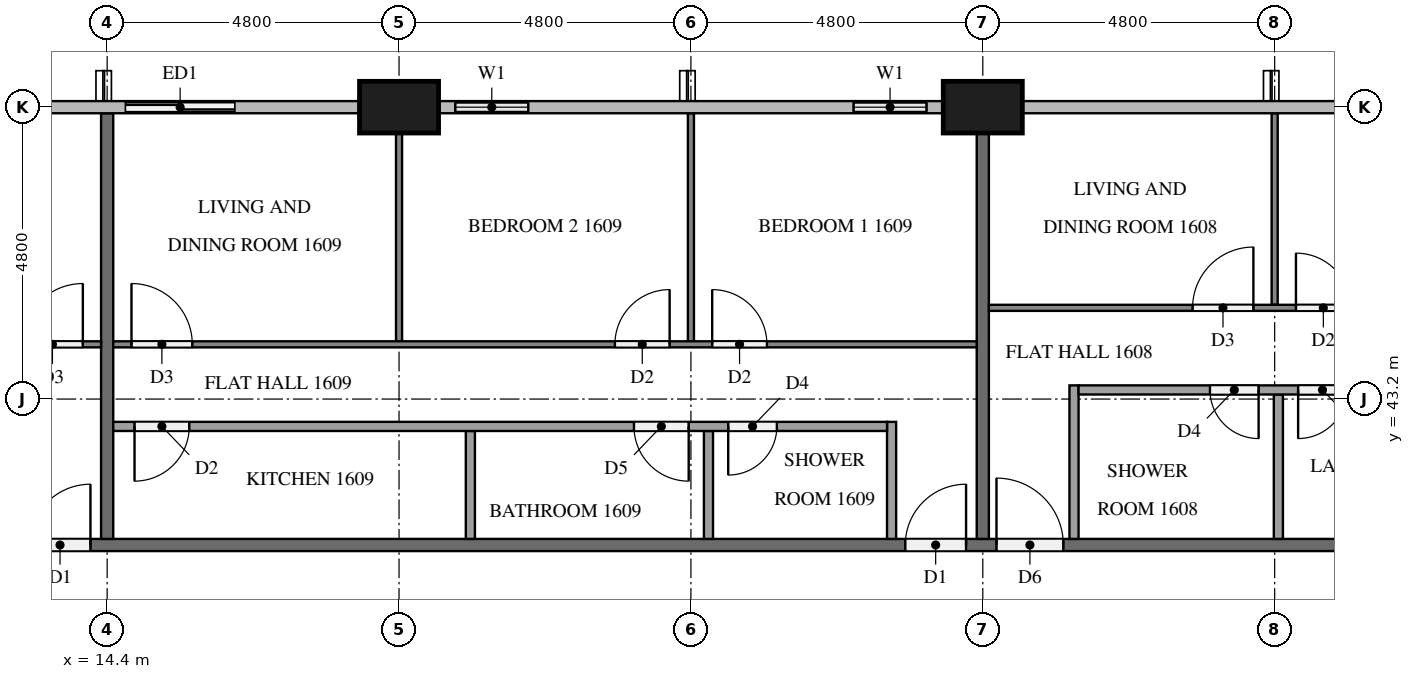
"""IFC4 building model, lengths in metres.
Left out: names, types, materials, properties, quantities, classifications, styles, units other than length and angle.
Written with IfcOpenShell. Run it as: python <this file> out.ifc"""

import sys

from ifc_helpers import new_model, si_unit, direction, frame, frame_2d, origin, origin_2d, place, context, subcontext, project, spatial, rectangle, extrude, element, fill, save


model = new_model("IFC4")
c1 = context("Model", 3, precision=1e-05, world=origin(), true_north=direction((0.0, 1.0)))
c2 = subcontext(c1, "Body", "Model", "MODEL_VIEW")
j1 = project(units=[si_unit("LENGTHUNIT", "METRE"), si_unit("PLANEANGLEUNIT", "RADIAN")], contexts=[c1])
p1 = place(None, origin())
s1 = spatial("IfcSite", under=j1, at=p1, CompositionType="ELEMENT")
p2 = place(p1, origin())
s2 = spatial("IfcBuilding", under=s1, at=p2, CompositionType="ELEMENT")
p3 = place(p2, frame((0.0, 0.0, 66.3)))
s3 = spatial("IfcBuildingStorey", under=s2, at=p3, CompositionType="ELEMENT", Elevation=66.3)
for number, where, z_axis, x_axis in (
    (1, (28.8, 48.0, 0.0), (0.0, 0.0, 1.0), (1.0, 0.0, 0.0)),
    (2, (19.2, 48.0, 0.0), (0.0, 0.0, 1.0), (1.0, 0.0, 0.0)),
):
    element("IfcColumn", number, at=place(p3, frame(where, z_axis=z_axis, x_axis=x_axis)), inside=s3, PredefinedType="COLUMN", context=c2, shape_type="SweptSolid", body=[
        extrude(rectangle(XDim=1.3, YDim=0.85, at=origin_2d()), origin(), (0.0, 0.0, 1.0), 3.2),
    ])
p4 = place(p3, frame((28.15, 48.0, 0.0), z_axis=(0.0, 0.0, 1.0), x_axis=(-1.0, 0.0, 0.0)))
e3 = element("IfcWall", 3, at=p4, inside=s3, PredefinedType="SOLIDWALL", context=c2, shape_type="SweptSolid", body=[
    extrude(rectangle(XDim=1.75, YDim=0.15, at=frame_2d((0.875, 0.0))), origin(), (0.0, 0.0, 1.0), 3.2),
])
p5 = place(p4, frame((0.275, 0.0, 0.9)))
e4 = element("IfcOpeningElement", 4, at=p5, cuts=e3, PredefinedType="OPENING", context=c2, shape_type="SweptSolid", body=[
    extrude(rectangle(XDim=1.2, YDim=1.4, at=frame_2d((0.6, 0.7))), frame((0.0, 0.085, 0.0), z_axis=(0.0, -1.0, 0.0), x_axis=(1.0, 0.0, 0.0)), (0.0, 0.0, 1.0), 0.17),
])
p6 = place(p3, frame((21.6, 48.0, 0.0), z_axis=(0.0, 0.0, 1.0), x_axis=(-1.0, 0.0, 0.0)))
e5 = element("IfcWall", 5, at=p6, inside=s3, PredefinedType="SOLIDWALL", context=c2, shape_type="SweptSolid", body=[
    extrude(rectangle(XDim=1.75, YDim=0.15, at=frame_2d((0.875, 0.0))), origin(), (0.0, 0.0, 1.0), 3.2),
])
p7 = place(p6, frame((0.275, 0.0, 0.9)))
e6 = element("IfcOpeningElement", 6, at=p7, cuts=e5, PredefinedType="OPENING", context=c2, shape_type="SweptSolid", body=[
    extrude(rectangle(XDim=1.2, YDim=1.4, at=frame_2d((0.6, 0.7))), frame((0.0, 0.085, 0.0), z_axis=(0.0, -1.0, 0.0), x_axis=(1.0, 0.0, 0.0)), (0.0, 0.0, 1.0), 0.17),
])
p8 = place(p3, frame((16.8, 48.0, 0.0), z_axis=(0.0, 0.0, 1.0), x_axis=(-1.0, 0.0, 0.0)))
e7 = element("IfcWall", 7, at=p8, inside=s3, PredefinedType="SOLIDWALL", context=c2, shape_type="SweptSolid", body=[
    extrude(rectangle(XDim=2.4, YDim=0.15, at=frame_2d((1.2, 0.0))), origin(), (0.0, 0.0, 1.0), 3.2),
])
p9 = place(p8, frame((0.3, 0.0, 0.0)))
e8 = element("IfcOpeningElement", 8, at=p9, cuts=e7, PredefinedType="OPENING", context=c2, shape_type="SweptSolid", body=[
    extrude(rectangle(XDim=1.8, YDim=2.4, at=frame_2d((0.9, 1.2))), frame((0.0, 0.085, 0.0), z_axis=(0.0, -1.0, 0.0), x_axis=(1.0, 0.0, 0.0)), (0.0, 0.0, 1.0), 0.17),
])
p10 = place(p3, frame((11.9, 40.8, 0.0), z_axis=(0.0, 0.0, 1.0), x_axis=(1.0, 0.0, 0.0)))
e9 = element("IfcWall", 9, at=p10, inside=s3, PredefinedType="PARTITIONING", context=c2, shape_type="SweptSolid", body=[
    extrude(rectangle(XDim=38.6, YDim=0.2, at=frame_2d((19.3, 0.0))), origin(), (0.0, 0.0, 1.0), 3.2),
])
p11 = place(p10, frame((36.375, 0.0, 0.0)))
e10 = element("IfcOpeningElement", 10, at=p11, cuts=e9, PredefinedType="OPENING", context=c2, shape_type="SweptSolid", body=[
    extrude(rectangle(XDim=1.0, YDim=2.1, at=frame_2d((0.5, 1.05))), frame((0.0, 0.11, 0.0), z_axis=(0.0, -1.0, 0.0), x_axis=(1.0, 0.0, 0.0)), (0.0, 0.0, 1.0), 0.22),
])
p12 = place(p10, frame((17.125, 0.0, 0.0)))
e11 = element("IfcOpeningElement", 11, at=p12, cuts=e9, PredefinedType="OPENING", context=c2, shape_type="SweptSolid", body=[
    extrude(rectangle(XDim=1.1, YDim=2.1, at=frame_2d((0.55, 1.05))), frame((0.0, 0.11, 0.0), z_axis=(0.0, -1.0, 0.0), x_axis=(1.0, 0.0, 0.0)), (0.0, 0.0, 1.0), 0.22),
])
p13 = place(p10, frame((15.625, 0.0, 0.0)))
e12 = element("IfcOpeningElement", 12, at=p13, cuts=e9, PredefinedType="OPENING", context=c2, shape_type="SweptSolid", body=[
    extrude(rectangle(XDim=1.0, YDim=2.1, at=frame_2d((0.5, 1.05))), frame((0.0, 0.11, 0.0), z_axis=(0.0, -1.0, 0.0), x_axis=(1.0, 0.0, 0.0)), (0.0, 0.0, 1.0), 0.22),
])
p14 = place(p10, frame((1.225, 0.0, 0.0)))
e13 = element("IfcOpeningElement", 13, at=p14, cuts=e9, PredefinedType="OPENING", context=c2, shape_type="SweptSolid", body=[
    extrude(rectangle(XDim=1.0, YDim=2.1, at=frame_2d((0.5, 1.05))), frame((0.0, 0.11, 0.0), z_axis=(0.0, -1.0, 0.0), x_axis=(1.0, 0.0, 0.0)), (0.0, 0.0, 1.0), 0.22),
])
p15 = place(p3, frame((28.8, 47.575, 0.0), z_axis=(0.0, 0.0, 1.0), x_axis=(0.0, -1.0, 0.0)))
e14 = element("IfcWall", 14, at=p15, inside=s3, PredefinedType="PARTITIONING", context=c2, shape_type="SweptSolid", body=[
    extrude(rectangle(XDim=6.675, YDim=0.2, at=frame_2d((3.337, 0.0))), origin(), (0.0, 0.0, 1.0), 3.2),
])
p16 = place(p3, frame((14.4, 47.9, 0.0), z_axis=(0.0, 0.0, 1.0), x_axis=(0.0, -1.0, 0.0)))
e15 = element("IfcWall", 15, at=p16, inside=s3, PredefinedType="PARTITIONING", context=c2, shape_type="SweptSolid", body=[
    extrude(rectangle(XDim=7.0, YDim=0.2, at=frame_2d((3.5, 0.0))), origin(), (0.0, 0.0, 1.0), 3.2),
])
p17 = place(p3, frame((33.6, 44.75, 0.0), z_axis=(0.0, 0.0, 1.0), x_axis=(0.0, 1.0, 0.0)))
e16 = element("IfcWall", 16, at=p17, inside=s3, PredefinedType="PARTITIONING", context=c2, shape_type="SweptSolid", body=[
    extrude(rectangle(XDim=3.15, YDim=0.1, at=frame_2d((1.575, 0.0))), origin(), (0.0, 0.0, 1.0), 3.2),
])
p18 = place(p3, frame((28.9, 44.7, 0.0), z_axis=(0.0, 0.0, 1.0), x_axis=(1.0, 0.0, 0.0)))
e17 = element("IfcWall", 17, at=p18, inside=s3, PredefinedType="PARTITIONING", context=c2, shape_type="SweptSolid", body=[
    extrude(rectangle(XDim=19.0, YDim=0.1, at=frame_2d((9.5, 0.0))), origin(), (0.0, 0.0, 1.0), 3.2),
])
p19 = place(p18, frame((3.35, 0.0, 0.0)))
e18 = element("IfcOpeningElement", 18, at=p19, cuts=e17, PredefinedType="OPENING", context=c2, shape_type="SweptSolid", body=[
    extrude(rectangle(XDim=1.0, YDim=2.1, at=frame_2d((0.5, 1.05))), frame((0.0, 0.06, 0.0), z_axis=(0.0, -1.0, 0.0), x_axis=(1.0, 0.0, 0.0)), (0.0, 0.0, 1.0), 0.12),
])
p20 = place(p18, frame((5.05, 0.0, 0.0)))
e19 = element("IfcOpeningElement", 19, at=p20, cuts=e17, PredefinedType="OPENING", context=c2, shape_type="SweptSolid", body=[
    extrude(rectangle(XDim=0.9, YDim=2.1, at=frame_2d((0.45, 1.05))), frame((0.0, 0.06, 0.0), z_axis=(0.0, -1.0, 0.0), x_axis=(1.0, 0.0, 0.0)), (0.0, 0.0, 1.0), 0.12),
])
p21 = place(p18, frame((13.05, 0.0, 0.0)))
e20 = element("IfcOpeningElement", 20, at=p21, cuts=e17, PredefinedType="OPENING", context=c2, shape_type="SweptSolid", body=[
    extrude(rectangle(XDim=0.9, YDim=2.1, at=frame_2d((0.45, 1.05))), frame((0.0, 0.06, 0.0), z_axis=(0.0, -1.0, 0.0), x_axis=(1.0, 0.0, 0.0)), (0.0, 0.0, 1.0), 0.12),
])
p22 = place(p18, frame((14.65, 0.0, 0.0)))
e21 = element("IfcOpeningElement", 21, at=p22, cuts=e17, PredefinedType="OPENING", context=c2, shape_type="SweptSolid", body=[
    extrude(rectangle(XDim=0.9, YDim=2.1, at=frame_2d((0.45, 1.05))), frame((0.0, 0.06, 0.0), z_axis=(0.0, -1.0, 0.0), x_axis=(1.0, 0.0, 0.0)), (0.0, 0.0, 1.0), 0.12),
])
p23 = place(p3, frame((33.661, 40.9, 0.0), z_axis=(0.0, 0.0, 1.0), x_axis=(0.0, 1.0, 0.0)))
e22 = element("IfcWall", 22, at=p23, inside=s3, PredefinedType="PARTITIONING", context=c2, shape_type="SweptSolid", body=[
    extrude(rectangle(XDim=2.375, YDim=0.15, at=frame_2d((1.188, 0.0))), origin(), (0.0, 0.0, 1.0), 3.2),
])
p24 = place(p3, frame((30.3, 40.9, 0.0), z_axis=(0.0, 0.0, 1.0), x_axis=(0.0, 1.0, 0.0)))
e23 = element("IfcWall", 23, at=p24, inside=s3, PredefinedType="PARTITIONING", context=c2, shape_type="SweptSolid", body=[
    extrude(rectangle(XDim=2.525, YDim=0.15, at=frame_2d((1.263, 0.0))), origin(), (0.0, 0.0, 1.0), 3.2),
])
p25 = place(p3, frame((47.9, 43.35, 0.0), z_axis=(0.0, 0.0, 1.0), x_axis=(-1.0, 0.0, 0.0)))
e24 = element("IfcWall", 24, at=p25, inside=s3, PredefinedType="PARTITIONING", context=c2, shape_type="SweptSolid", body=[
    extrude(rectangle(XDim=17.525, YDim=0.15, at=frame_2d((8.762, 0.0))), origin(), (0.0, 0.0, 1.0), 3.2),
])
p26 = place(p25, frame((14.564, 0.0, 0.0)))
e25 = element("IfcOpeningElement", 25, at=p26, cuts=e24, PredefinedType="OPENING", context=c2, shape_type="SweptSolid", body=[
    extrude(rectangle(XDim=0.8, YDim=2.1, at=frame_2d((0.4, 1.05))), frame((0.0, 0.085, 0.0), z_axis=(0.0, -1.0, 0.0), x_axis=(1.0, 0.0, 0.0)), (0.0, 0.0, 1.0), 0.17),
])
p27 = place(p25, frame((13.114, 0.0, 0.0)))
e26 = element("IfcOpeningElement", 26, at=p27, cuts=e24, PredefinedType="OPENING", context=c2, shape_type="SweptSolid", body=[
    extrude(rectangle(XDim=0.8, YDim=2.1, at=frame_2d((0.4, 1.05))), frame((0.0, 0.085, 0.0), z_axis=(0.0, -1.0, 0.0), x_axis=(1.0, 0.0, 0.0)), (0.0, 0.0, 1.0), 0.17),
])
p28 = place(p25, frame((4.706, 0.0, 0.0)))
e27 = element("IfcOpeningElement", 27, at=p28, cuts=e24, PredefinedType="OPENING", context=c2, shape_type="SweptSolid", body=[
    extrude(rectangle(XDim=0.9, YDim=2.1, at=frame_2d((0.45, 1.05))), frame((0.0, 0.085, 0.0), z_axis=(0.0, -1.0, 0.0), x_axis=(1.0, 0.0, 0.0)), (0.0, 0.0, 1.0), 0.17),
])
p29 = place(p25, frame((3.156, 0.0, 0.0)))
e28 = element("IfcOpeningElement", 28, at=p29, cuts=e24, PredefinedType="OPENING", context=c2, shape_type="SweptSolid", body=[
    extrude(rectangle(XDim=0.9, YDim=2.1, at=frame_2d((0.45, 1.05))), frame((0.0, 0.085, 0.0), z_axis=(0.0, -1.0, 0.0), x_axis=(1.0, 0.0, 0.0)), (0.0, 0.0, 1.0), 0.17),
])
p30 = place(p3, frame((24.0, 44.15, 0.0), z_axis=(0.0, 0.0, 1.0), x_axis=(0.0, 1.0, 0.0)))
e29 = element("IfcWall", 29, at=p30, inside=s3, PredefinedType="PARTITIONING", context=c2, shape_type="SweptSolid", body=[
    extrude(rectangle(XDim=3.75, YDim=0.1, at=frame_2d((1.875, 0.0))), origin(), (0.0, 0.0, 1.0), 3.2),
])
p31 = place(p3, frame((19.2, 44.15, 0.0), z_axis=(0.0, 0.0, 1.0), x_axis=(0.0, 1.0, 0.0)))
e30 = element("IfcWall", 30, at=p31, inside=s3, PredefinedType="PARTITIONING", context=c2, shape_type="SweptSolid", body=[
    extrude(rectangle(XDim=3.425, YDim=0.1, at=frame_2d((1.712, 0.0))), origin(), (0.0, 0.0, 1.0), 3.2),
])
p32 = place(p3, frame((14.5, 44.1, 0.0), z_axis=(0.0, 0.0, 1.0), x_axis=(1.0, 0.0, 0.0)))
e31 = element("IfcWall", 31, at=p32, inside=s3, PredefinedType="PARTITIONING", context=c2, shape_type="SweptSolid", body=[
    extrude(rectangle(XDim=14.2, YDim=0.1, at=frame_2d((7.1, 0.0))), origin(), (0.0, 0.0, 1.0), 3.2),
])
p33 = place(p32, frame((9.85, 0.0, 0.0)))
e32 = element("IfcOpeningElement", 32, at=p33, cuts=e31, PredefinedType="OPENING", context=c2, shape_type="SweptSolid", body=[
    extrude(rectangle(XDim=0.9, YDim=2.1, at=frame_2d((0.45, 1.05))), frame((0.0, 0.06, 0.0), z_axis=(0.0, -1.0, 0.0), x_axis=(1.0, 0.0, 0.0)), (0.0, 0.0, 1.0), 0.12),
])
p34 = place(p32, frame((8.25, 0.0, 0.0)))
e33 = element("IfcOpeningElement", 33, at=p34, cuts=e31, PredefinedType="OPENING", context=c2, shape_type="SweptSolid", body=[
    extrude(rectangle(XDim=0.9, YDim=2.1, at=frame_2d((0.45, 1.05))), frame((0.0, 0.06, 0.0), z_axis=(0.0, -1.0, 0.0), x_axis=(1.0, 0.0, 0.0)), (0.0, 0.0, 1.0), 0.12),
])
p35 = place(p32, frame((0.3, 0.0, 0.0)))
e34 = element("IfcOpeningElement", 34, at=p35, cuts=e31, PredefinedType="OPENING", context=c2, shape_type="SweptSolid", body=[
    extrude(rectangle(XDim=1.0, YDim=2.1, at=frame_2d((0.5, 1.05))), frame((0.0, 0.06, 0.0), z_axis=(0.0, -1.0, 0.0), x_axis=(1.0, 0.0, 0.0)), (0.0, 0.0, 1.0), 0.12),
])
for number, where, z_axis, x_axis in (
    (35, (24.289, 40.9, 0.0), (0.0, 0.0, 1.0), (0.0, 1.0, 0.0)),
    (36, (20.373, 40.9, 0.0), (0.0, 0.0, 1.0), (0.0, 1.0, 0.0)),
):
    element("IfcWall", number, at=place(p3, frame(where, z_axis=z_axis, x_axis=x_axis)), inside=s3, PredefinedType="PARTITIONING", context=c2, shape_type="SweptSolid", body=[
        extrude(rectangle(XDim=1.775, YDim=0.15, at=frame_2d((0.888, 0.0))), origin(), (0.0, 0.0, 1.0), 3.2),
    ])
p36 = place(p3, frame((27.3, 40.9, 0.0), z_axis=(0.0, 0.0, 1.0), x_axis=(0.0, 1.0, 0.0)))
e37 = element("IfcWall", 37, at=p36, inside=s3, PredefinedType="PARTITIONING", context=c2, shape_type="SweptSolid", body=[
    extrude(rectangle(XDim=1.925, YDim=0.15, at=frame_2d((0.962, 0.0))), origin(), (0.0, 0.0, 1.0), 3.2),
])
p37 = place(p3, frame((27.225, 42.75, 0.0), z_axis=(0.0, 0.0, 1.0), x_axis=(-1.0, 0.0, 0.0)))
e38 = element("IfcWall", 38, at=p37, inside=s3, PredefinedType="PARTITIONING", context=c2, shape_type="SweptSolid", body=[
    extrude(rectangle(XDim=12.725, YDim=0.15, at=frame_2d((6.363, 0.0))), origin(), (0.0, 0.0, 1.0), 3.2),
])
p38 = place(p37, frame((1.812, 0.0, 0.0)))
e39 = element("IfcOpeningElement", 39, at=p38, cuts=e38, PredefinedType="OPENING", context=c2, shape_type="SweptSolid", body=[
    extrude(rectangle(XDim=0.8, YDim=2.1, at=frame_2d((0.4, 1.05))), frame((0.0, 0.085, 0.0), z_axis=(0.0, -1.0, 0.0), x_axis=(1.0, 0.0, 0.0)), (0.0, 0.0, 1.0), 0.17),
])
p39 = place(p37, frame((3.261, 0.0, 0.0)))
e40 = element("IfcOpeningElement", 40, at=p39, cuts=e38, PredefinedType="OPENING", context=c2, shape_type="SweptSolid", body=[
    extrude(rectangle(XDim=0.9, YDim=2.1, at=frame_2d((0.45, 1.05))), frame((0.0, 0.085, 0.0), z_axis=(0.0, -1.0, 0.0), x_axis=(1.0, 0.0, 0.0)), (0.0, 0.0, 1.0), 0.17),
])
p40 = place(p37, frame((11.475, 0.0, 0.0)))
e41 = element("IfcOpeningElement", 41, at=p40, cuts=e38, PredefinedType="OPENING", context=c2, shape_type="SweptSolid", body=[
    extrude(rectangle(XDim=0.9, YDim=2.1, at=frame_2d((0.45, 1.05))), frame((0.0, 0.085, 0.0), z_axis=(0.0, -1.0, 0.0), x_axis=(1.0, 0.0, 0.0)), (0.0, 0.0, 1.0), 0.17),
])
p41 = place(p3, frame((5.141, 44.1, 0.0), z_axis=(0.0, 0.0, 1.0), x_axis=(1.0, 0.0, 0.0)))
e42 = element("IfcWall", 42, at=p41, inside=s3, PredefinedType="PARTITIONING", context=c2, shape_type="SweptSolid", body=[
    extrude(rectangle(XDim=9.159, YDim=0.1, at=frame_2d((4.58, 0.0))), origin(), (0.0, 0.0, 1.0), 3.2),
])
p42 = place(p41, frame((7.859, 0.0, 0.0)))
e43 = element("IfcOpeningElement", 43, at=p42, cuts=e42, PredefinedType="OPENING", context=c2, shape_type="SweptSolid", body=[
    extrude(rectangle(XDim=1.0, YDim=2.1, at=frame_2d((0.5, 1.05))), frame((0.0, 0.06, 0.0), z_axis=(0.0, -1.0, 0.0), x_axis=(1.0, 0.0, 0.0)), (0.0, 0.0, 1.0), 0.12),
])
p43 = place(p41, frame((0.3, 0.0, 0.0)))
e44 = element("IfcOpeningElement", 44, at=p43, cuts=e42, PredefinedType="OPENING", context=c2, shape_type="SweptSolid", body=[
    extrude(rectangle(XDim=0.9, YDim=2.1, at=frame_2d((0.45, 1.05))), frame((0.0, 0.06, 0.0), z_axis=(0.0, -1.0, 0.0), x_axis=(1.0, 0.0, 0.0)), (0.0, 0.0, 1.0), 0.12),
])
p44 = place(p5, origin())
e45 = element("IfcWindow", 45, at=p44, inside=s3, PartitioningType="SINGLE_PANEL", PredefinedType="WINDOW", context=c2, shape_type="SweptSolid", body=[
    extrude(rectangle(XDim=1.2, YDim=1.4, at=frame_2d((0.6, 0.7))), frame((0.0, 0.03, 0.0), z_axis=(0.0, -1.0, 0.0), x_axis=(1.0, 0.0, 0.0)), (0.0, 0.0, 1.0), 0.06),
])
fill(e4, e45)
p45 = place(p7, origin())
e46 = element("IfcWindow", 46, at=p45, inside=s3, PartitioningType="SINGLE_PANEL", PredefinedType="WINDOW", context=c2, shape_type="SweptSolid", body=[
    extrude(rectangle(XDim=1.2, YDim=1.4, at=frame_2d((0.6, 0.7))), frame((0.0, 0.03, 0.0), z_axis=(0.0, -1.0, 0.0), x_axis=(1.0, 0.0, 0.0)), (0.0, 0.0, 1.0), 0.06),
])
fill(e6, e46)
p46 = place(p9, origin())
e47 = element("IfcDoor", 47, at=p46, inside=s3, OperationType="SLIDING_TO_LEFT", PredefinedType="DOOR", context=c2, shape_type="SweptSolid", body=[
    extrude(rectangle(XDim=1.8, YDim=2.4, at=frame_2d((0.9, 1.2))), frame((0.0, 0.025, 0.0), z_axis=(0.0, -1.0, 0.0), x_axis=(1.0, 0.0, 0.0)), (0.0, 0.0, 1.0), 0.05),
])
fill(e8, e47)
p47 = place(p12, origin())
e48 = element("IfcDoor", 48, at=p47, inside=s3, OperationType="SINGLE_SWING_LEFT", PredefinedType="DOOR", context=c2, shape_type="SweptSolid", body=[
    extrude(rectangle(XDim=1.1, YDim=2.1, at=frame_2d((0.55, 1.05))), frame((0.0, 0.025, 0.0), z_axis=(0.0, -1.0, 0.0), x_axis=(1.0, 0.0, 0.0)), (0.0, 0.0, 1.0), 0.05),
])
fill(e11, e48)
p48 = place(p13, origin())
e49 = element("IfcDoor", 49, at=p48, inside=s3, OperationType="SINGLE_SWING_RIGHT", PredefinedType="DOOR", context=c2, shape_type="SweptSolid", body=[
    extrude(rectangle(XDim=1.0, YDim=2.1, at=frame_2d((0.5, 1.05))), frame((0.0, 0.025, 0.0), z_axis=(0.0, -1.0, 0.0), x_axis=(1.0, 0.0, 0.0)), (0.0, 0.0, 1.0), 0.05),
])
fill(e12, e49)
p49 = place(p14, origin())
e50 = element("IfcDoor", 50, at=p49, inside=s3, OperationType="SINGLE_SWING_RIGHT", PredefinedType="DOOR", context=c2, shape_type="SweptSolid", body=[
    extrude(rectangle(XDim=1.0, YDim=2.1, at=frame_2d((0.5, 1.05))), frame((0.0, 0.025, 0.0), z_axis=(0.0, -1.0, 0.0), x_axis=(1.0, 0.0, 0.0)), (0.0, 0.0, 1.0), 0.05),
])
fill(e13, e50)
p50 = place(p19, origin())
e51 = element("IfcDoor", 51, at=p50, inside=s3, OperationType="SINGLE_SWING_RIGHT", PredefinedType="DOOR", context=c2, shape_type="SweptSolid", body=[
    extrude(rectangle(XDim=1.0, YDim=2.1, at=frame_2d((0.5, 1.05))), frame((0.0, 0.025, 0.0), z_axis=(0.0, -1.0, 0.0), x_axis=(1.0, 0.0, 0.0)), (0.0, 0.0, 1.0), 0.05),
])
fill(e18, e51)
p51 = place(p20, origin())
e52 = element("IfcDoor", 52, at=p51, inside=s3, OperationType="SINGLE_SWING_LEFT", PredefinedType="DOOR", context=c2, shape_type="SweptSolid", body=[
    extrude(rectangle(XDim=0.9, YDim=2.1, at=frame_2d((0.45, 1.05))), frame((0.0, 0.025, 0.0), z_axis=(0.0, -1.0, 0.0), x_axis=(1.0, 0.0, 0.0)), (0.0, 0.0, 1.0), 0.05),
])
fill(e19, e52)
p52 = place(p26, origin())
e53 = element("IfcDoor", 53, at=p52, inside=s3, OperationType="SINGLE_SWING_LEFT", PredefinedType="DOOR", context=c2, shape_type="SweptSolid", body=[
    extrude(rectangle(XDim=0.8, YDim=2.1, at=frame_2d((0.4, 1.05))), frame((0.0, 0.025, 0.0), z_axis=(0.0, -1.0, 0.0), x_axis=(1.0, 0.0, 0.0)), (0.0, 0.0, 1.0), 0.05),
])
fill(e25, e53)
p53 = place(p27, origin())
e54 = element("IfcDoor", 54, at=p53, inside=s3, OperationType="SINGLE_SWING_RIGHT", PredefinedType="DOOR", context=c2, shape_type="SweptSolid", body=[
    extrude(rectangle(XDim=0.8, YDim=2.1, at=frame_2d((0.4, 1.05))), frame((0.0, 0.025, 0.0), z_axis=(0.0, -1.0, 0.0), x_axis=(1.0, 0.0, 0.0)), (0.0, 0.0, 1.0), 0.05),
])
fill(e26, e54)
p54 = place(p33, origin())
e55 = element("IfcDoor", 55, at=p54, inside=s3, OperationType="SINGLE_SWING_LEFT", PredefinedType="DOOR", context=c2, shape_type="SweptSolid", body=[
    extrude(rectangle(XDim=0.9, YDim=2.1, at=frame_2d((0.45, 1.05))), frame((0.0, 0.025, 0.0), z_axis=(0.0, -1.0, 0.0), x_axis=(1.0, 0.0, 0.0)), (0.0, 0.0, 1.0), 0.05),
])
fill(e32, e55)
p55 = place(p34, origin())
e56 = element("IfcDoor", 56, at=p55, inside=s3, OperationType="SINGLE_SWING_RIGHT", PredefinedType="DOOR", context=c2, shape_type="SweptSolid", body=[
    extrude(rectangle(XDim=0.9, YDim=2.1, at=frame_2d((0.45, 1.05))), frame((0.0, 0.025, 0.0), z_axis=(0.0, -1.0, 0.0), x_axis=(1.0, 0.0, 0.0)), (0.0, 0.0, 1.0), 0.05),
])
fill(e33, e56)
p56 = place(p35, origin())
e57 = element("IfcDoor", 57, at=p56, inside=s3, OperationType="SINGLE_SWING_LEFT", PredefinedType="DOOR", context=c2, shape_type="SweptSolid", body=[
    extrude(rectangle(XDim=1.0, YDim=2.1, at=frame_2d((0.5, 1.05))), frame((0.0, 0.025, 0.0), z_axis=(0.0, -1.0, 0.0), x_axis=(1.0, 0.0, 0.0)), (0.0, 0.0, 1.0), 0.05),
])
fill(e34, e57)
p57 = place(p38, origin())
e58 = element("IfcDoor", 58, at=p57, inside=s3, OperationType="SINGLE_SWING_RIGHT", PredefinedType="DOOR", context=c2, shape_type="SweptSolid", body=[
    extrude(rectangle(XDim=0.8, YDim=2.1, at=frame_2d((0.4, 1.05))), frame((0.0, 0.025, 0.0), z_axis=(0.0, -1.0, 0.0), x_axis=(1.0, 0.0, 0.0)), (0.0, 0.0, 1.0), 0.05),
])
fill(e39, e58)
p58 = place(p39, origin())
e59 = element("IfcDoor", 59, at=p58, inside=s3, OperationType="SINGLE_SWING_LEFT", PredefinedType="DOOR", context=c2, shape_type="SweptSolid", body=[
    extrude(rectangle(XDim=0.9, YDim=2.1, at=frame_2d((0.45, 1.05))), frame((0.0, 0.025, 0.0), z_axis=(0.0, -1.0, 0.0), x_axis=(1.0, 0.0, 0.0)), (0.0, 0.0, 1.0), 0.05),
])
fill(e40, e59)
p59 = place(p40, origin())
e60 = element("IfcDoor", 60, at=p59, inside=s3, OperationType="SINGLE_SWING_RIGHT", PredefinedType="DOOR", context=c2, shape_type="SweptSolid", body=[
    extrude(rectangle(XDim=0.9, YDim=2.1, at=frame_2d((0.45, 1.05))), frame((0.0, 0.025, 0.0), z_axis=(0.0, -1.0, 0.0), x_axis=(1.0, 0.0, 0.0)), (0.0, 0.0, 1.0), 0.05),
])
fill(e41, e60)
p60 = place(p42, origin())
e61 = element("IfcDoor", 61, at=p60, inside=s3, OperationType="SINGLE_SWING_RIGHT", PredefinedType="DOOR", context=c2, shape_type="SweptSolid", body=[
    extrude(rectangle(XDim=1.0, YDim=2.1, at=frame_2d((0.5, 1.05))), frame((0.0, 0.025, 0.0), z_axis=(0.0, -1.0, 0.0), x_axis=(1.0, 0.0, 0.0)), (0.0, 0.0, 1.0), 0.05),
])
fill(e43, e61)
save(model, sys.argv[1])
